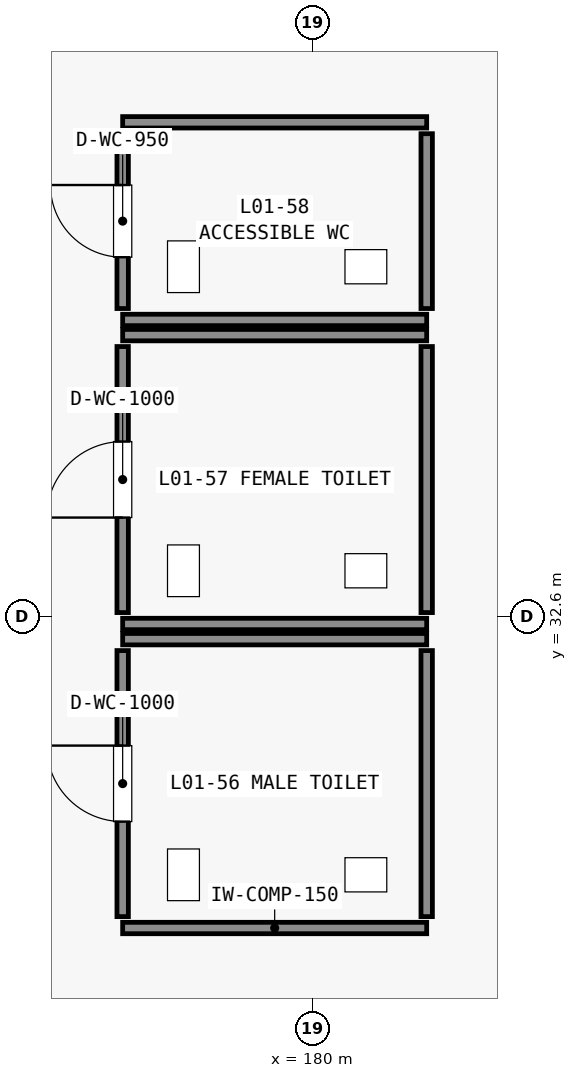
"""IFC4 building model, lengths in metres.
Left out: names, types, materials, properties, quantities, classifications, styles, units other than length and angle.
Written with IfcOpenShell. Run it as: python <this file> out.ifc"""

import sys

from ifc_helpers import new_model, si_unit, direction, frame, frame_2d, origin, place, context, subcontext, project, spatial, rectangle, extrude, element, fill, save


model = new_model("IFC4")
c1 = context("Model", 3, precision=1e-05, world=origin(), true_north=direction((0.0, 1.0)))
c2 = subcontext(c1, "Body", "Model", "MODEL_VIEW")
j1 = project(units=[si_unit("LENGTHUNIT", "METRE"), si_unit("PLANEANGLEUNIT", "RADIAN")], contexts=[c1])
p1 = place(None, origin())
s1 = spatial("IfcSite", under=j1, at=p1, CompositionType="ELEMENT")
p2 = place(p1, origin())
s2 = spatial("IfcBuilding", under=s1, at=p2, CompositionType="ELEMENT")
p3 = place(p2, frame((0.0, 0.0, 6.0)))
s3 = spatial("IfcBuildingStorey", under=s2, at=p3, CompositionType="ELEMENT", Elevation=6.0)
p4 = place(p3, frame((177.5, 28.5, 0.0), z_axis=(0.0, 0.0, 1.0), x_axis=(1.0, 0.0, 0.0)))
e1 = element("IfcWall", 1, at=p4, inside=s3, PredefinedType="STANDARD", context=c2, shape_type="SweptSolid", body=[
    extrude(rectangle(XDim=4.0, YDim=0.15, at=frame_2d((2.0, 0.0))), origin(), (0.0, 0.0, 1.0), 4.347),
])
p5 = place(p3, frame((177.5, 32.3, 0.0), z_axis=(0.0, 0.0, 1.0), x_axis=(1.0, 0.0, 0.0)))
e2 = element("IfcWall", 2, at=p5, inside=s3, PredefinedType="STANDARD", context=c2, shape_type="SweptSolid", body=[
    extrude(rectangle(XDim=4.0, YDim=0.15, at=frame_2d((2.0, 0.0))), origin(), (0.0, 0.0, 1.0), 5.04),
])
p6 = place(p3, frame((177.5, 28.65, 0.0), z_axis=(0.0, 0.0, 1.0), x_axis=(0.0, 1.0, 0.0)))
e3 = element("IfcWall", 3, at=p6, inside=s3, PredefinedType="STANDARD", context=c2, shape_type="SweptSolid", body=[
    extrude(rectangle(XDim=3.5, YDim=0.15, at=frame_2d((1.75, 0.0))), origin(), (0.0, 0.0, 1.0), 4.347),
])
p7 = place(p6, frame((1.25, 0.0, 0.0)))
e4 = element("IfcOpeningElement", 4, at=p7, cuts=e3, PredefinedType="OPENING", context=c2, shape_type="SweptSolid", body=[
    extrude(rectangle(XDim=1.0, YDim=2.15, at=frame_2d((0.5, 1.075))), frame((0.0, 0.085, 0.0), z_axis=(0.0, -1.0, 0.0), x_axis=(1.0, 0.0, 0.0)), (0.0, 0.0, 1.0), 0.17),
])
p8 = place(p3, frame((181.5, 28.65, 0.0), z_axis=(0.0, 0.0, 1.0), x_axis=(0.0, 1.0, 0.0)))
e5 = element("IfcWall", 5, at=p8, inside=s3, PredefinedType="STANDARD", context=c2, shape_type="SweptSolid", body=[
    extrude(rectangle(XDim=3.5, YDim=0.15, at=frame_2d((1.75, 0.0))), origin(), (0.0, 0.0, 1.0), 4.347),
])
for number, where, z_axis, x_axis in (
    (6, (177.5, 32.5, 0.0), (0.0, 0.0, 1.0), (1.0, 0.0, 0.0)),
    (7, (177.5, 36.3, 0.0), (0.0, 0.0, 1.0), (1.0, 0.0, 0.0)),
):
    element("IfcWall", number, at=place(p3, frame(where, z_axis=z_axis, x_axis=x_axis)), inside=s3, PredefinedType="STANDARD", context=c2, shape_type="SweptSolid", body=[
        extrude(rectangle(XDim=4.0, YDim=0.15, at=frame_2d((2.0, 0.0))), origin(), (0.0, 0.0, 1.0), 5.04),
    ])
p9 = place(p3, frame((177.5, 32.65, 0.0), z_axis=(0.0, 0.0, 1.0), x_axis=(0.0, 1.0, 0.0)))
e8 = element("IfcWall", 8, at=p9, inside=s3, PredefinedType="STANDARD", context=c2, shape_type="SweptSolid", body=[
    extrude(rectangle(XDim=3.5, YDim=0.15, at=frame_2d((1.75, 0.0))), origin(), (0.0, 0.0, 1.0), 4.634),
])
p10 = place(p9, frame((1.25, 0.0, 0.0)))
e9 = element("IfcOpeningElement", 9, at=p10, cuts=e8, PredefinedType="OPENING", context=c2, shape_type="SweptSolid", body=[
    extrude(rectangle(XDim=1.0, YDim=2.15, at=frame_2d((0.5, 1.075))), frame((0.0, 0.085, 0.0), z_axis=(0.0, -1.0, 0.0), x_axis=(1.0, 0.0, 0.0)), (0.0, 0.0, 1.0), 0.17),
])
p11 = place(p3, frame((181.5, 32.65, 0.0), z_axis=(0.0, 0.0, 1.0), x_axis=(0.0, 1.0, 0.0)))
e10 = element("IfcWall", 10, at=p11, inside=s3, PredefinedType="STANDARD", context=c2, shape_type="SweptSolid", body=[
    extrude(rectangle(XDim=3.5, YDim=0.15, at=frame_2d((1.75, 0.0))), origin(), (0.0, 0.0, 1.0), 4.634),
])
for number, where, z_axis, x_axis in (
    (11, (177.5, 36.5, 0.0), (0.0, 0.0, 1.0), (1.0, 0.0, 0.0)),
    (12, (177.5, 39.1, 0.0), (0.0, 0.0, 1.0), (1.0, 0.0, 0.0)),
):
    element("IfcWall", number, at=place(p3, frame(where, z_axis=z_axis, x_axis=x_axis)), inside=s3, PredefinedType="STANDARD", context=c2, shape_type="SweptSolid", body=[
        extrude(rectangle(XDim=4.0, YDim=0.15, at=frame_2d((2.0, 0.0))), origin(), (0.0, 0.0, 1.0), 5.04),
    ])
p12 = place(p3, frame((177.5, 36.65, 0.0), z_axis=(0.0, 0.0, 1.0), x_axis=(0.0, 1.0, 0.0)))
e13 = element("IfcWall", 13, at=p12, inside=s3, PredefinedType="STANDARD", context=c2, shape_type="SweptSolid", body=[
    extrude(rectangle(XDim=2.3, YDim=0.15, at=frame_2d((1.15, 0.0))), origin(), (0.0, 0.0, 1.0), 5.04),
])
p13 = place(p12, frame((0.675, 0.0, 0.0)))
e14 = element("IfcOpeningElement", 14, at=p13, cuts=e13, PredefinedType="OPENING", context=c2, shape_type="SweptSolid", body=[
    extrude(rectangle(XDim=0.95, YDim=2.15, at=frame_2d((0.475, 1.075))), frame((0.0, 0.085, 0.0), z_axis=(0.0, -1.0, 0.0), x_axis=(1.0, 0.0, 0.0)), (0.0, 0.0, 1.0), 0.17),
])
p14 = place(p3, frame((181.5, 36.65, 0.0), z_axis=(0.0, 0.0, 1.0), x_axis=(0.0, 1.0, 0.0)))
e15 = element("IfcWall", 15, at=p14, inside=s3, PredefinedType="STANDARD", context=c2, shape_type="SweptSolid", body=[
    extrude(rectangle(XDim=2.3, YDim=0.15, at=frame_2d((1.15, 0.0))), origin(), (0.0, 0.0, 1.0), 5.04),
])
p15 = place(p7, origin())
e16 = element("IfcDoor", 16, at=p15, inside=s3, OperationType="SINGLE_SWING_RIGHT", PredefinedType="DOOR", context=c2, shape_type="SweptSolid", body=[
    extrude(rectangle(XDim=1.0, YDim=2.15, at=frame_2d((0.5, 1.075))), frame((0.0, 0.025, 0.0), z_axis=(0.0, -1.0, 0.0), x_axis=(1.0, 0.0, 0.0)), (0.0, 0.0, 1.0), 0.05),
])
fill(e4, e16)
p16 = place(p10, origin())
e17 = element("IfcDoor", 17, at=p16, inside=s3, OperationType="SINGLE_SWING_LEFT", PredefinedType="DOOR", context=c2, shape_type="SweptSolid", body=[
    extrude(rectangle(XDim=1.0, YDim=2.15, at=frame_2d((0.5, 1.075))), frame((0.0, 0.025, 0.0), z_axis=(0.0, -1.0, 0.0), x_axis=(1.0, 0.0, 0.0)), (0.0, 0.0, 1.0), 0.05),
])
fill(e9, e17)
p17 = place(p13, origin())
e18 = element("IfcDoor", 18, at=p17, inside=s3, OperationType="SINGLE_SWING_RIGHT", PredefinedType="DOOR", context=c2, shape_type="SweptSolid", body=[
    extrude(rectangle(XDim=0.95, YDim=2.15, at=frame_2d((0.475, 1.075))), frame((0.0, 0.025, 0.0), z_axis=(0.0, -1.0, 0.0), x_axis=(1.0, 0.0, 0.0)), (0.0, 0.0, 1.0), 0.05),
])
fill(e14, e18)
save(model, sys.argv[1])
